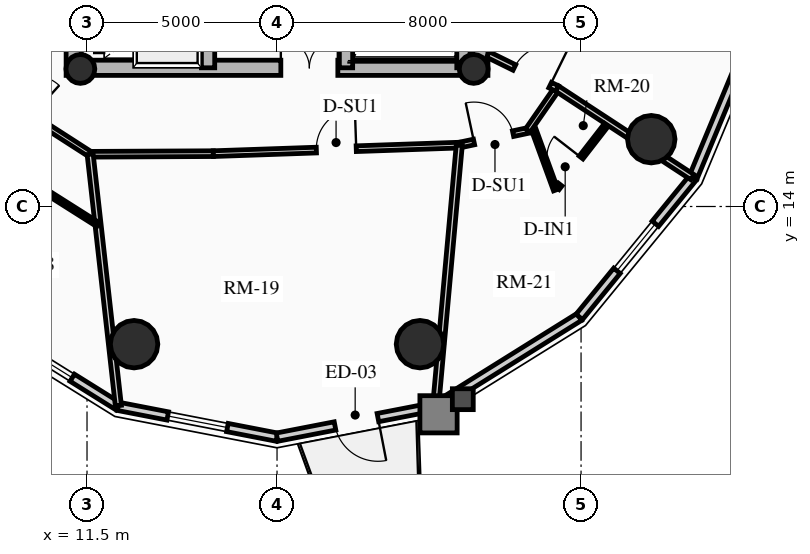
"""IFC4 building model, lengths in metres.
Left out: names, types, materials, properties, quantities, classifications, styles, units other than length and angle.
Written with IfcOpenShell. Run it as: python <this file> out.ifc"""

import sys

from ifc_helpers import new_model, si_unit, direction, frame, frame_2d, origin, origin_2d, place, context, subcontext, project, spatial, rectangle, circle, hollow_circle, extrude, source, transform, mapped, element, fill, save


model = new_model("IFC4")
c1 = context("Model", 3, precision=1e-05, world=origin(), true_north=direction((0.0, 1.0)))
c2 = subcontext(c1, "Body", "Model", "MODEL_VIEW")
j1 = project(units=[si_unit("LENGTHUNIT", "METRE"), si_unit("PLANEANGLEUNIT", "RADIAN")], contexts=[c1])
p1 = place(None, origin())
s1 = spatial("IfcSite", under=j1, at=p1, CompositionType="ELEMENT")
p2 = place(p1, origin())
s2 = spatial("IfcBuilding", under=s1, at=p2, CompositionType="ELEMENT")
p3 = place(p2, frame((0.0, 0.0, 169.06)))
s3 = spatial("IfcBuildingStorey", under=s2, at=p3, CompositionType="ELEMENT", Elevation=169.06)
for number, where, z_axis, x_axis in (
    (1, (11.15, 17.45, 0.0), (0.0, 0.0, 1.0), (0.0, 1.0, 0.0)),
    (2, (21.85, 17.45, 0.0), (0.0, 0.0, 1.0), (0.0, 1.0, 0.0)),
):
    element("IfcWall", number, at=place(p3, frame(where, z_axis=z_axis, x_axis=x_axis)), inside=s3, PredefinedType="SHEAR", context=c2, shape_type="SweptSolid", body=[
        extrude(rectangle(XDim=14.1, YDim=0.4, at=frame_2d((7.05, 0.0))), origin(), (0.0, 0.0, 1.0), 2.91),
    ])
p4 = place(p3, frame((11.15, 17.65, 0.0), z_axis=(0.0, 0.0, 1.0), x_axis=(1.0, 0.0, 0.0)))
e3 = element("IfcWall", 3, at=p4, inside=s3, PredefinedType="SHEAR", context=c2, shape_type="SweptSolid", body=[
    extrude(rectangle(XDim=10.7, YDim=0.4, at=frame_2d((5.35, 0.0))), origin(), (0.0, 0.0, 1.0), 2.91),
])
m1 = source(origin(), c2, "Body", "SweptSolid", [
    extrude(rectangle(XDim=1.5, YDim=2.02, at=frame_2d((0.75, 1.01))), frame((0.0, 0.21, 0.0), z_axis=(0.0, -1.0, 0.0), x_axis=(1.0, 0.0, 0.0)), (0.0, 0.0, 1.0), 0.42),
])
p5 = place(p4, frame((5.45, 0.0, 0.0)))
e4 = element("IfcOpeningElement", 4, at=p5, cuts=e3, PredefinedType="OPENING", context=c2, shape_type="MappedRepresentation", body=[
    mapped(m1, transform((0.0, 0.0, 0.0), x_axis=(1.0, 0.0, 0.0), y_axis=(0.0, 1.0, 0.0), z_axis=(0.0, 0.0, 1.0), scale=1.0)),
])
p6 = place(p3, frame((14.685, 17.65, 0.0), z_axis=(0.0, 0.0, 1.0), x_axis=(0.0, 1.0, 0.0)))
e5 = element("IfcWall", 5, at=p6, inside=s3, PredefinedType="SHEAR", context=c2, shape_type="SweptSolid", body=[
    extrude(rectangle(XDim=13.7, YDim=0.35, at=frame_2d((6.85, 0.0))), origin(), (0.0, 0.0, 1.0), 2.91),
])
m2 = source(origin(), c2, "Body", "SweptSolid", [
    extrude(rectangle(XDim=1.1, YDim=2.015, at=frame_2d((0.55, 1.007))), frame((0.0, 0.185, 0.0), z_axis=(0.0, -1.0, 0.0), x_axis=(1.0, 0.0, 0.0)), (0.0, 0.0, 1.0), 0.37),
])
p7 = place(p6, frame((4.85, 0.0, 0.0)))
e6 = element("IfcOpeningElement", 6, at=p7, cuts=e5, PredefinedType="OPENING", context=c2, shape_type="MappedRepresentation", body=[
    mapped(m2, transform((0.0, 0.0, 0.0), x_axis=(1.0, 0.0, 0.0), y_axis=(0.0, 1.0, 0.0), z_axis=(0.0, 0.0, 1.0), scale=1.0)),
])
p8 = place(p6, frame((0.625, 0.0, 0.0)))
e7 = element("IfcOpeningElement", 7, at=p8, cuts=e5, PredefinedType="OPENING", context=c2, shape_type="MappedRepresentation", body=[
    mapped(m2, transform((0.0, 0.0, 0.0), x_axis=(1.0, 0.0, 0.0), y_axis=(0.0, 1.0, 0.0), z_axis=(0.0, 0.0, 1.0), scale=1.0)),
])
p9 = place(p6, frame((2.625, 0.0, 0.0)))
e8 = element("IfcOpeningElement", 8, at=p9, cuts=e5, PredefinedType="OPENING", context=c2, shape_type="MappedRepresentation", body=[
    mapped(m2, transform((0.0, 0.0, 0.0), x_axis=(1.0, 0.0, 0.0), y_axis=(0.0, 1.0, 0.0), z_axis=(0.0, 0.0, 1.0), scale=1.0)),
])
m3 = source(origin(), c2, "Body", "SweptSolid", [
    extrude(rectangle(XDim=1.15, YDim=2.02, at=frame_2d((0.575, 1.01))), frame((0.0, 0.185, 0.0), z_axis=(0.0, -1.0, 0.0), x_axis=(1.0, 0.0, 0.0)), (0.0, 0.0, 1.0), 0.37),
])
p10 = place(p6, frame((7.27, 0.0, 0.0)))
e9 = element("IfcOpeningElement", 9, at=p10, cuts=e5, PredefinedType="OPENING", context=c2, shape_type="MappedRepresentation", body=[
    mapped(m3, transform((0.0, 0.0, 0.0), x_axis=(1.0, 0.0, 0.0), y_axis=(0.0, 1.0, 0.0), z_axis=(0.0, 0.0, 1.0), scale=1.0)),
])
p11 = place(p3, frame((18.315, 17.65, 0.0), z_axis=(0.0, 0.0, 1.0), x_axis=(0.0, 1.0, 0.0)))
e10 = element("IfcWall", 10, at=p11, inside=s3, PredefinedType="SHEAR", context=c2, shape_type="SweptSolid", body=[
    extrude(rectangle(XDim=9.6, YDim=0.35, at=frame_2d((4.8, 0.0))), origin(), (0.0, 0.0, 1.0), 2.91),
])
p12 = place(p11, frame((5.28, 0.0, 0.0)))
e11 = element("IfcOpeningElement", 11, at=p12, cuts=e10, PredefinedType="OPENING", context=c2, shape_type="MappedRepresentation", body=[
    mapped(m3, transform((0.0, 0.0, 0.0), x_axis=(1.0, 0.0, 0.0), y_axis=(0.0, 1.0, 0.0), z_axis=(0.0, 0.0, 1.0), scale=1.0)),
])
p13 = place(p3, frame((21.405, 17.65, 0.0), z_axis=(0.0, 0.0, 1.0), x_axis=(0.0, 1.0, 0.0)))
e12 = element("IfcWall", 12, at=p13, inside=s3, PredefinedType="SHEAR", context=c2, shape_type="SweptSolid", body=[
    extrude(rectangle(XDim=6.695, YDim=0.35, at=frame_2d((3.348, 0.0))), origin(), (0.0, 0.0, 1.0), 2.91),
])
for number, where, z_axis, x_axis in (
    (13, (11.325, 17.62, 0.0), (0.0, 0.0, 1.0), (1.0, 0.0, 0.0)),
    (14, (21.675, 17.62, 0.0), (0.0, 0.0, 1.0), (1.0, 0.0, 0.0)),
):
    element("IfcColumn", number, at=place(p3, frame(where, z_axis=z_axis, x_axis=x_axis)), inside=s3, PredefinedType="COLUMN", context=c2, shape_type="SweptSolid", body=[
        extrude(hollow_circle(Radius=0.38, WallThickness=0.032, at=origin_2d()), origin(), (0.0, 0.0, 1.0), 2.91),
    ])
for number, where, z_axis, x_axis in (
    (15, (12.739, 10.377, 0.0), (0.0, 0.0, 1.0), (1.0, 0.0, 0.0)),
    (16, (20.261, 10.377, 0.0), (0.0, 0.0, 1.0), (1.0, 0.0, 0.0)),
    (17, (26.347, 15.771, 0.0), (0.0, 0.0, 1.0), (1.0, 0.0, 0.0)),
):
    element("IfcColumn", number, at=place(p3, frame(where, z_axis=z_axis, x_axis=x_axis)), inside=s3, PredefinedType="USERDEFINED", context=c2, shape_type="SweptSolid", body=[
        extrude(circle(Radius=0.625, at=origin_2d()), origin(), (0.0, 0.0, 1.0), 2.91),
    ])
p14 = place(p3, frame((12.319, 8.741, 0.0), z_axis=(0.0, 0.0, 1.0), x_axis=(-0.848399108042, 0.529357113368, 0.0)))
e18 = element("IfcWall", 18, at=p14, inside=s3, PredefinedType="SOLIDWALL", context=c2, shape_type="SweptSolid", body=[
    extrude(rectangle(XDim=4.446, YDim=0.22, at=frame_2d((2.223, 0.0))), origin(), (0.0, 0.0, 1.0), 2.245),
])
m4 = source(origin(), c2, "Body", "SweptSolid", [
    extrude(rectangle(XDim=1.6, YDim=1.3, at=frame_2d((0.8, 0.65))), frame((0.0, 0.12, 0.0), z_axis=(0.0, -1.0, 0.0), x_axis=(1.0, 0.0, 0.0)), (0.0, 0.0, 1.0), 0.24),
])
p15 = place(p14, frame((1.423, 0.0, 0.65)))
e19 = element("IfcOpeningElement", 19, at=p15, cuts=e18, PredefinedType="OPENING", context=c2, shape_type="MappedRepresentation", body=[
    mapped(m4, transform((0.0, 0.0, 0.0), x_axis=(1.0, 0.0, 0.0), y_axis=(0.0, 1.0, 0.0), z_axis=(0.0, 0.0, 1.0), scale=1.0)),
])
p16 = place(p3, frame((16.5, 7.93, 0.0), z_axis=(0.0, 0.0, 1.0), x_axis=(-0.981703883443, 0.190413983815, 0.0)))
e20 = element("IfcWall", 20, at=p16, inside=s3, PredefinedType="SOLIDWALL", context=c2, shape_type="SweptSolid", body=[
    extrude(rectangle(XDim=4.259, YDim=0.22, at=frame_2d((2.13, 0.0))), origin(), (0.0, 0.0, 1.0), 2.245),
])
p17 = place(p16, frame((1.33, 0.0, 0.65)))
e21 = element("IfcOpeningElement", 21, at=p17, cuts=e20, PredefinedType="OPENING", context=c2, shape_type="MappedRepresentation", body=[
    mapped(m4, transform((0.0, 0.0, 0.0), x_axis=(1.0, 0.0, 0.0), y_axis=(0.0, 1.0, 0.0), z_axis=(0.0, 0.0, 1.0), scale=1.0)),
])
p18 = place(p3, frame((20.681, 8.741, 0.0), z_axis=(0.0, 0.0, 1.0), x_axis=(-0.981703883443, -0.190413983815, 0.0)))
e22 = element("IfcWall", 22, at=p18, inside=s3, PredefinedType="SOLIDWALL", context=c2, shape_type="SweptSolid", body=[
    extrude(rectangle(XDim=4.259, YDim=0.22, at=frame_2d((2.13, 0.0))), origin(), (0.0, 0.0, 1.0), 2.245),
])
m5 = source(origin(), c2, "Body", "SweptSolid", [
    extrude(rectangle(XDim=1.15, YDim=2.005, at=frame_2d((0.575, 1.002))), frame((0.0, 0.12, 0.0), z_axis=(0.0, -1.0, 0.0), x_axis=(1.0, 0.0, 0.0)), (0.0, 0.0, 1.0), 0.24),
])
p19 = place(p18, frame((1.555, 0.0, 0.0)))
e23 = element("IfcOpeningElement", 23, at=p19, cuts=e22, PredefinedType="OPENING", context=c2, shape_type="MappedRepresentation", body=[
    mapped(m5, transform((0.0, 0.0, 0.0), x_axis=(1.0, 0.0, 0.0), y_axis=(0.0, 1.0, 0.0), z_axis=(0.0, 0.0, 1.0), scale=1.0)),
])
p20 = place(p3, frame((24.453, 11.094, 0.0), z_axis=(0.0, 0.0, 1.0), x_axis=(-0.848399108042, -0.529357113368, 0.0)))
e24 = element("IfcWall", 24, at=p20, inside=s3, PredefinedType="SOLIDWALL", context=c2, shape_type="SweptSolid", body=[
    extrude(rectangle(XDim=4.446, YDim=0.22, at=frame_2d((2.223, 0.0))), origin(), (0.0, 0.0, 1.0), 2.245),
])
p21 = place(p3, frame((27.447, 14.76, 0.0), z_axis=(0.0, 0.0, 1.0), x_axis=(-0.632470615287, -0.774584353572, 0.0)))
e25 = element("IfcWall", 25, at=p21, inside=s3, PredefinedType="SOLIDWALL", context=c2, shape_type="SweptSolid", body=[
    extrude(rectangle(XDim=4.733, YDim=0.22, at=frame_2d((2.366, 0.0))), origin(), (0.0, 0.0, 1.0), 2.245),
])
p22 = place(p21, frame((1.566, 0.0, 0.65)))
e26 = element("IfcOpeningElement", 26, at=p22, cuts=e25, PredefinedType="OPENING", context=c2, shape_type="MappedRepresentation", body=[
    mapped(m4, transform((0.0, 0.0, 0.0), x_axis=(1.0, 0.0, 0.0), y_axis=(0.0, 1.0, 0.0), z_axis=(0.0, 0.0, 1.0), scale=1.0)),
])
p23 = place(p3, frame((29.369, 19.38, 0.0), z_axis=(0.0, 0.0, 1.0), x_axis=(-0.384144094086, -0.923273152961, 0.0)))
e27 = element("IfcWall", 27, at=p23, inside=s3, PredefinedType="SOLIDWALL", context=c2, shape_type="SweptSolid", body=[
    extrude(rectangle(XDim=5.003, YDim=0.22, at=frame_2d((2.501, 0.0))), origin(), (0.0, 0.0, 1.0), 2.245),
])
p24 = place(p3, frame((10.277, 16.214, 0.0), z_axis=(0.0, 0.0, 1.0), x_axis=(0.841060909507, -0.540940427865, 0.0)))
e28 = element("IfcWall", 28, at=p24, inside=s3, PredefinedType="PARTITIONING", context=c2, shape_type="SweptSolid", body=[
    extrude(rectangle(XDim=1.552, YDim=0.15, at=frame_2d((0.776, 0.0))), origin(), (0.0, 0.0, 1.0), 2.245),
])
p25 = place(p3, frame((11.583, 15.375, 0.0), z_axis=(0.0, 0.0, 1.0), x_axis=(0.999988014548, 0.004895994347, 0.0)))
e29 = element("IfcWall", 29, at=p25, inside=s3, PredefinedType="PARTITIONING", context=c2, shape_type="SweptSolid", body=[
    extrude(rectangle(XDim=3.241, YDim=0.15, at=frame_2d((1.621, 0.0))), origin(), (0.0, 0.0, 1.0), 2.245),
])
p26 = place(p3, frame((14.824, 15.391, 0.0), z_axis=(0.0, 0.0, 1.0), x_axis=(0.999399579064, 0.034647963376, 0.0)))
e30 = element("IfcWall", 30, at=p26, inside=s3, PredefinedType="PARTITIONING", context=c2, shape_type="SweptSolid", body=[
    extrude(rectangle(XDim=6.476, YDim=0.15, at=frame_2d((3.238, 0.0))), origin(), (0.0, 0.0, 1.0), 2.245),
])
m6 = source(origin(), c2, "Body", "SweptSolid", [
    extrude(rectangle(XDim=1.05, YDim=2.015, at=frame_2d((0.525, 1.007))), frame((0.0, 0.085, 0.0), z_axis=(0.0, -1.0, 0.0), x_axis=(1.0, 0.0, 0.0)), (0.0, 0.0, 1.0), 0.17),
])
p27 = place(p26, frame((2.713, 0.0, 0.0)))
e31 = element("IfcOpeningElement", 31, at=p27, cuts=e30, PredefinedType="OPENING", context=c2, shape_type="MappedRepresentation", body=[
    mapped(m6, transform((0.0, 0.0, 0.0), x_axis=(1.0, 0.0, 0.0), y_axis=(0.0, 1.0, 0.0), z_axis=(0.0, 0.0, 1.0), scale=1.0)),
])
p28 = place(p3, frame((21.295, 15.615, 0.0), z_axis=(0.0, 0.0, 1.0), x_axis=(0.978043957244, 0.20839869889, 0.0)))
e32 = element("IfcWall", 32, at=p28, inside=s3, PredefinedType="PARTITIONING", context=c2, shape_type="SweptSolid", body=[
    extrude(rectangle(XDim=1.844, YDim=0.15, at=frame_2d((0.922, 0.0))), origin(), (0.0, 0.0, 1.0), 2.245),
])
p29 = place(p28, frame((0.397, 0.0, 0.0)))
e33 = element("IfcOpeningElement", 33, at=p29, cuts=e32, PredefinedType="OPENING", context=c2, shape_type="MappedRepresentation", body=[
    mapped(m6, transform((0.0, 0.0, 0.0), x_axis=(1.0, 0.0, 0.0), y_axis=(0.0, 1.0, 0.0), z_axis=(0.0, 0.0, 1.0), scale=1.0)),
])
p30 = place(p3, frame((23.099, 15.999, 0.0), z_axis=(0.0, 0.0, 1.0), x_axis=(0.570001625459, 0.821643564433, 0.0)))
e34 = element("IfcWall", 34, at=p30, inside=s3, PredefinedType="PARTITIONING", context=c2, shape_type="SweptSolid", body=[
    extrude(rectangle(XDim=1.347, YDim=0.15, at=frame_2d((0.673, 0.0))), origin(), (0.0, 0.0, 1.0), 2.245),
])
p31 = place(p3, frame((11.583, 15.375, 0.0), z_axis=(0.0, 0.0, 1.0), x_axis=(0.111538514066, -0.993760111838, 0.0)))
e35 = element("IfcWall", 35, at=p31, inside=s3, PredefinedType="PARTITIONING", context=c2, shape_type="SweptSolid", body=[
    extrude(rectangle(XDim=6.656, YDim=0.16, at=frame_2d((3.328, 0.0))), origin(), (0.0, 0.0, 1.0), 2.245),
])
p32 = place(p3, frame((21.295, 15.615, 0.0), z_axis=(0.0, 0.0, 1.0), x_axis=(-0.090129576558, -0.995930047458, 0.0)))
e36 = element("IfcWall", 36, at=p32, inside=s3, PredefinedType="PARTITIONING", context=c2, shape_type="SweptSolid", body=[
    extrude(rectangle(XDim=6.883, YDim=0.16, at=frame_2d((3.441, 0.0))), origin(), (0.0, 0.0, 1.0), 2.245),
])
p33 = place(p3, frame((23.866, 17.106, 0.0), z_axis=(0.0, 0.0, 1.0), x_axis=(0.836641352238, -0.547751081902, 0.0)))
e37 = element("IfcWall", 37, at=p33, inside=s3, PredefinedType="PARTITIONING", context=c2, shape_type="SweptSolid", body=[
    extrude(rectangle(XDim=4.26, YDim=0.16, at=frame_2d((2.13, 0.0))), origin(), (0.0, 0.0, 1.0), 2.245),
])
p34 = place(p3, frame((22.05, 18.0, 0.0), z_axis=(0.0, 0.0, 1.0), x_axis=(0.897159648657, -0.441706423795, 0.0)))
e38 = element("IfcWall", 38, at=p34, inside=s3, PredefinedType="PARTITIONING", context=c2, shape_type="SweptSolid", body=[
    extrude(rectangle(XDim=2.025, YDim=0.16, at=frame_2d((1.012, 0.0))), origin(), (0.0, 0.0, 1.0), 2.245),
])
m7 = source(origin(), c2, "Body", "SweptSolid", [
    extrude(rectangle(XDim=1.05, YDim=2.015, at=frame_2d((0.525, 1.007))), frame((0.0, 0.09, 0.0), z_axis=(0.0, -1.0, 0.0), x_axis=(1.0, 0.0, 0.0)), (0.0, 0.0, 1.0), 0.18),
])
p35 = place(p34, frame((0.775, 0.0, 0.0)))
e39 = element("IfcOpeningElement", 39, at=p35, cuts=e38, PredefinedType="OPENING", context=c2, shape_type="MappedRepresentation", body=[
    mapped(m7, transform((0.0, 0.0, 0.0), x_axis=(1.0, 0.0, 0.0), y_axis=(0.0, 1.0, 0.0), z_axis=(0.0, 0.0, 1.0), scale=1.0)),
])
p36 = place(p3, frame((9.796, 14.785, 0.0), z_axis=(0.0, 0.0, 1.0), x_axis=(0.844898543763, -0.534926584446, 0.0)))
e40 = element("IfcWall", 40, at=p36, inside=s3, PredefinedType="PARTITIONING", context=c2, shape_type="SweptSolid", body=[
    extrude(rectangle(XDim=2.361, YDim=0.125, at=frame_2d((1.18, 0.0))), origin(), (0.0, 0.0, 1.0), 2.245),
])
p37 = place(p3, frame((23.256, 16.018, 0.0), z_axis=(0.0, 0.0, 1.0), x_axis=(0.342788033774, -0.939412776101, 0.0)))
e41 = element("IfcWall", 41, at=p37, inside=s3, PredefinedType="PARTITIONING", context=c2, shape_type="SweptSolid", body=[
    extrude(rectangle(XDim=1.688, YDim=0.125, at=frame_2d((0.844, 0.0))), origin(), (0.0, 0.0, 1.0), 2.675),
])
p38 = place(p3, frame((23.875, 14.484, 0.0), z_axis=(0.0, 0.0, 1.0), x_axis=(0.61297586552, 0.790101631621, 0.0)))
e42 = element("IfcWall", 42, at=p38, inside=s3, PredefinedType="PARTITIONING", context=c2, shape_type="SweptSolid", body=[
    extrude(rectangle(XDim=2.103, YDim=0.125, at=frame_2d((1.052, 0.0))), origin(), (0.0, 0.0, 1.0), 2.245),
])
m8 = source(origin(), c2, "Body", "SweptSolid", [
    extrude(rectangle(XDim=0.9, YDim=2.005, at=frame_2d((0.45, 1.002))), frame((0.0, 0.073, 0.0), z_axis=(0.0, -1.0, 0.0), x_axis=(1.0, 0.0, 0.0)), (0.0, 0.0, 1.0), 0.145),
])
p39 = place(p38, frame((0.12, 0.0, 0.0)))
e43 = element("IfcOpeningElement", 43, at=p39, cuts=e42, PredefinedType="OPENING", context=c2, shape_type="MappedRepresentation", body=[
    mapped(m8, transform((0.0, 0.0, 0.0), x_axis=(1.0, 0.0, 0.0), y_axis=(0.0, 1.0, 0.0), z_axis=(0.0, 0.0, 1.0), scale=1.0)),
])
m9 = source(origin(), c2, "Body", "SweptSolid", [
    extrude(rectangle(XDim=1.6, YDim=1.3, at=frame_2d((0.8, 0.65))), frame((0.0, 0.03, 0.0), z_axis=(0.0, -1.0, 0.0), x_axis=(1.0, 0.0, 0.0)), (0.0, 0.0, 1.0), 0.06),
])
p40 = place(p15, origin())
e44 = element("IfcWindow", 44, at=p40, inside=s3, PartitioningType="SINGLE_PANEL", PredefinedType="WINDOW", context=c2, shape_type="MappedRepresentation", body=[
    mapped(m9, transform((0.0, 0.0, 0.0), x_axis=(1.0, 0.0, 0.0), y_axis=(0.0, 1.0, 0.0), z_axis=(0.0, 0.0, 1.0), scale=1.0)),
])
fill(e19, e44)
p41 = place(p17, origin())
e45 = element("IfcWindow", 45, at=p41, inside=s3, PartitioningType="SINGLE_PANEL", PredefinedType="WINDOW", context=c2, shape_type="MappedRepresentation", body=[
    mapped(m9, transform((0.0, 0.0, 0.0), x_axis=(1.0, 0.0, 0.0), y_axis=(0.0, 1.0, 0.0), z_axis=(0.0, 0.0, 1.0), scale=1.0)),
])
fill(e21, e45)
m10 = source(origin(), c2, "Body", "SweptSolid", [
    extrude(rectangle(XDim=1.15, YDim=2.005, at=frame_2d((0.575, 1.002))), frame((0.0, 0.025, 0.0), z_axis=(0.0, -1.0, 0.0), x_axis=(1.0, 0.0, 0.0)), (0.0, 0.0, 1.0), 0.05),
])
p42 = place(p19, origin())
e46 = element("IfcDoor", 46, at=p42, inside=s3, OperationType="SINGLE_SWING_LEFT", PredefinedType="DOOR", context=c2, shape_type="MappedRepresentation", body=[
    mapped(m10, transform((0.0, 0.0, 0.0), x_axis=(1.0, 0.0, 0.0), y_axis=(0.0, 1.0, 0.0), z_axis=(0.0, 0.0, 1.0), scale=1.0)),
])
fill(e23, e46)
p43 = place(p22, origin())
e47 = element("IfcWindow", 47, at=p43, inside=s3, PartitioningType="SINGLE_PANEL", PredefinedType="WINDOW", context=c2, shape_type="MappedRepresentation", body=[
    mapped(m9, transform((0.0, 0.0, 0.0), x_axis=(1.0, 0.0, 0.0), y_axis=(0.0, 1.0, 0.0), z_axis=(0.0, 0.0, 1.0), scale=1.0)),
])
fill(e26, e47)
m11 = source(origin(), c2, "Body", "SweptSolid", [
    extrude(rectangle(XDim=1.5, YDim=2.02, at=frame_2d((0.75, 1.01))), frame((0.0, 0.025, 0.0), z_axis=(0.0, -1.0, 0.0), x_axis=(1.0, 0.0, 0.0)), (0.0, 0.0, 1.0), 0.05),
])
p44 = place(p5, origin())
e48 = element("IfcDoor", 48, at=p44, inside=s3, OperationType="DOUBLE_DOOR_SINGLE_SWING", PredefinedType="DOOR", context=c2, shape_type="MappedRepresentation", body=[
    mapped(m11, transform((0.0, 0.0, 0.0), x_axis=(1.0, 0.0, 0.0), y_axis=(0.0, 1.0, 0.0), z_axis=(0.0, 0.0, 1.0), scale=1.0)),
])
fill(e4, e48)
m12 = source(origin(), c2, "Body", "SweptSolid", [
    extrude(rectangle(XDim=1.05, YDim=2.015, at=frame_2d((0.525, 1.007))), frame((0.0, 0.025, 0.0), z_axis=(0.0, -1.0, 0.0), x_axis=(1.0, 0.0, 0.0)), (0.0, 0.0, 1.0), 0.05),
])
p45 = place(p35, origin())
e49 = element("IfcDoor", 49, at=p45, inside=s3, OperationType="SINGLE_SWING_RIGHT", PredefinedType="DOOR", context=c2, shape_type="MappedRepresentation", body=[
    mapped(m12, transform((0.0, 0.0, 0.0), x_axis=(1.0, 0.0, 0.0), y_axis=(0.0, 1.0, 0.0), z_axis=(0.0, 0.0, 1.0), scale=1.0)),
])
fill(e39, e49)
p46 = place(p27, origin())
e50 = element("IfcDoor", 50, at=p46, inside=s3, OperationType="SINGLE_SWING_RIGHT", PredefinedType="DOOR", context=c2, shape_type="MappedRepresentation", body=[
    mapped(m12, transform((0.0, 0.0, 0.0), x_axis=(1.0, 0.0, 0.0), y_axis=(0.0, 1.0, 0.0), z_axis=(0.0, 0.0, 1.0), scale=1.0)),
])
fill(e31, e50)
p47 = place(p29, origin())
e51 = element("IfcDoor", 51, at=p47, inside=s3, OperationType="SINGLE_SWING_LEFT", PredefinedType="DOOR", context=c2, shape_type="MappedRepresentation", body=[
    mapped(m12, transform((0.0, 0.0, 0.0), x_axis=(1.0, 0.0, 0.0), y_axis=(0.0, 1.0, 0.0), z_axis=(0.0, 0.0, 1.0), scale=1.0)),
])
fill(e33, e51)
m13 = source(origin(), c2, "Body", "SweptSolid", [
    extrude(rectangle(XDim=0.9, YDim=2.005, at=frame_2d((0.45, 1.002))), frame((0.0, 0.025, 0.0), z_axis=(0.0, -1.0, 0.0), x_axis=(1.0, 0.0, 0.0)), (0.0, 0.0, 1.0), 0.05),
])
p48 = place(p39, origin())
e52 = element("IfcDoor", 52, at=p48, inside=s3, OperationType="SINGLE_SWING_RIGHT", PredefinedType="DOOR", context=c2, shape_type="MappedRepresentation", body=[
    mapped(m13, transform((0.0, 0.0, 0.0), x_axis=(1.0, 0.0, 0.0), y_axis=(0.0, 1.0, 0.0), z_axis=(0.0, 0.0, 1.0), scale=1.0)),
])
fill(e43, e52)
save(model, sys.argv[1])
